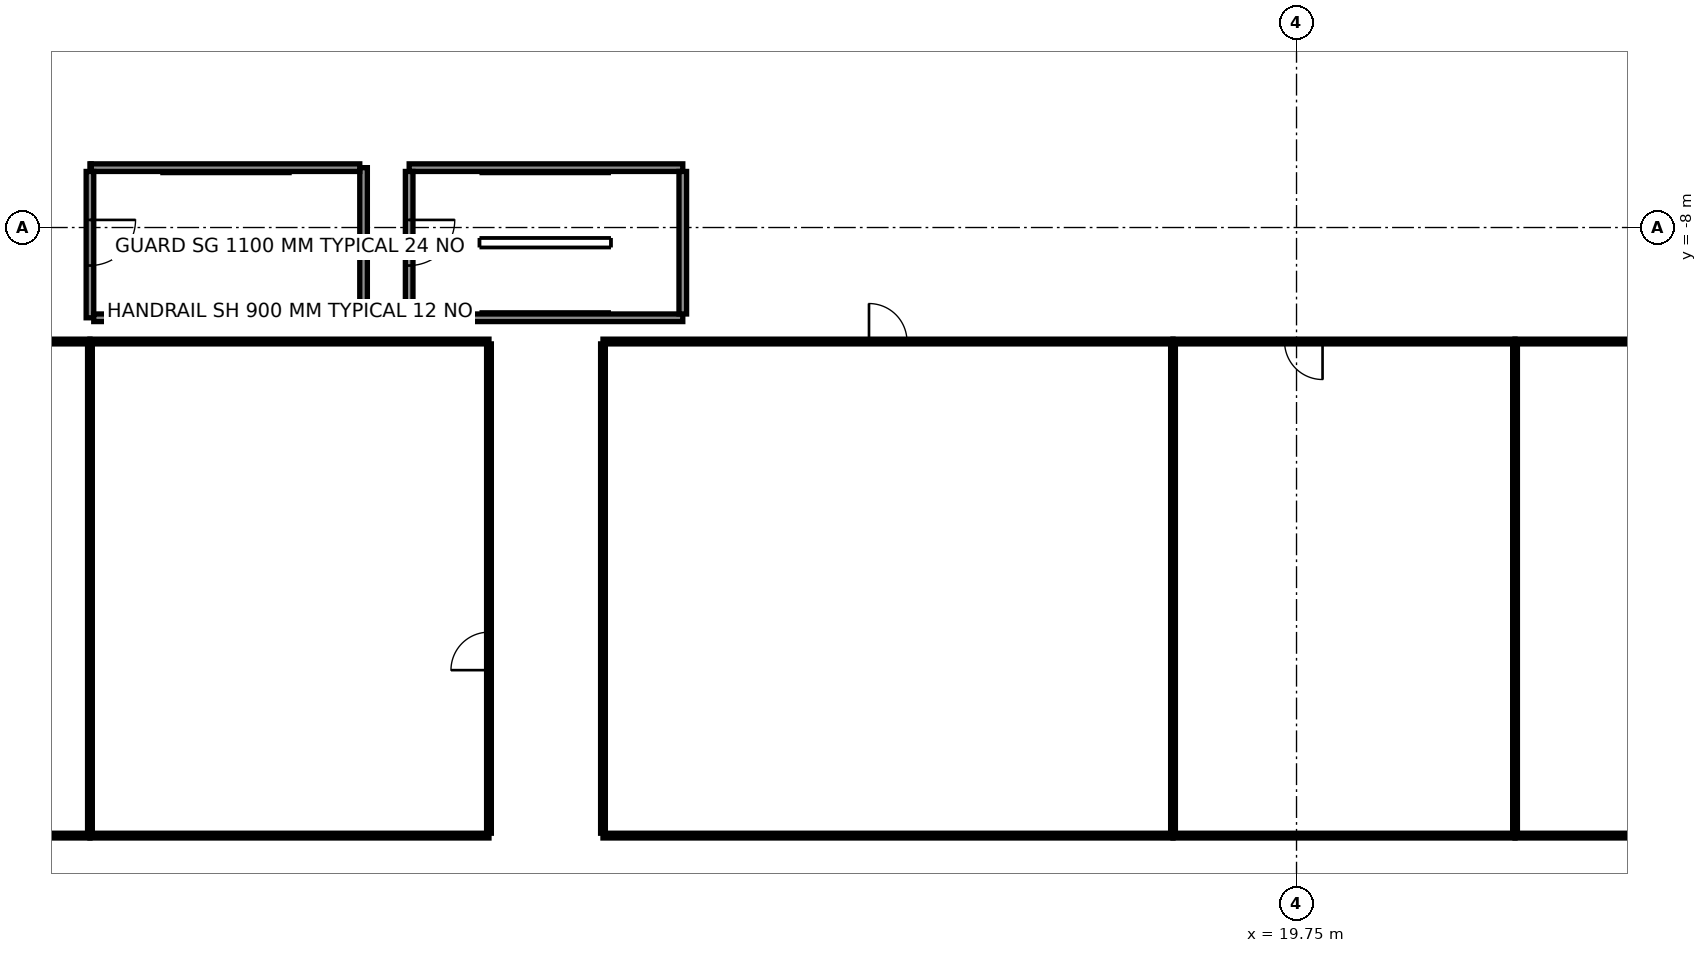
"""IFC4 building model, lengths in metres.
Left out: names, types, materials, properties, quantities, classifications, styles, units other than length and angle.
Written with IfcOpenShell. Run it as: python <this file> out.ifc"""

import sys

from ifc_helpers import new_model, si_unit, direction, frame, frame_2d, origin, origin_2d, place, context, subcontext, project, spatial, rectangle, hollow_rectangle, circle, extrude, element, fill, save


model = new_model("IFC4")
c1 = context("Model", 3, precision=1e-05, world=origin(), true_north=direction((0.0, 1.0)))
c2 = subcontext(c1, "Body", "Model", "MODEL_VIEW")
j1 = project(units=[si_unit("LENGTHUNIT", "METRE"), si_unit("PLANEANGLEUNIT", "RADIAN")], contexts=[c1])
p1 = place(None, origin())
s1 = spatial("IfcSite", under=j1, at=p1, CompositionType="ELEMENT")
p2 = place(p1, origin())
s2 = spatial("IfcBuilding", under=s1, at=p2, CompositionType="ELEMENT")
p3 = place(p2, frame((0.0, 0.0, 12.0)))
s3 = spatial("IfcBuildingStorey", under=s2, at=p3, CompositionType="ELEMENT", Elevation=12.0)
for number, where, z_axis, x_axis in (
    (1, (-4.2, -12.6, 0.0), (0.0, 0.0, 1.0), (1.0, 0.0, 0.0)),
    (2, (4.2, -12.6, 0.0), (0.0, 0.0, 1.0), (1.0, 0.0, 0.0)),
):
    element("IfcColumn", number, at=place(p3, frame(where, z_axis=z_axis, x_axis=x_axis)), inside=s3, PredefinedType="COLUMN", context=c2, shape_type="SweptSolid", body=[
        extrude(circle(Radius=0.6, at=origin_2d()), origin(), (0.0, 0.0, 1.0), 4.5),
    ])
for number, where, z_axis, x_axis in (
    (3, (-11.317, -11.797, 0.0), (0.0, 0.0, 1.0), (0.866, -0.5, 0.0)),
    (4, (8.96, -6.107, 0.0), (0.0, 0.0, 1.0), (-0.966, -0.259, 0.0)),
    (5, (14.594, -17.156, 0.0), (0.0, 0.0, 1.0), (-0.707, -0.707, 0.0)),
    (6, (25.643, -22.79, 0.0), (0.0, 0.0, 1.0), (-0.259, -0.966, 0.0)),
):
    element("IfcColumn", number, at=place(p3, frame(where, z_axis=z_axis, x_axis=x_axis)), inside=s3, PredefinedType="COLUMN", context=c2, shape_type="SweptSolid", body=[
        extrude(hollow_rectangle(XDim=1.5, YDim=1.5, WallThickness=0.07, at=origin_2d()), origin(), (0.0, 0.0, 1.0), 4.5),
    ])
p4 = place(p3, frame((19.3, -8.0, 0.0), z_axis=(0.0, 0.0, 1.0), x_axis=(1.0, 0.0, 0.0)))
e7 = element("IfcWall", 7, at=p4, inside=s3, PredefinedType="SHEAR", context=c2, shape_type="SweptSolid", body=[
    extrude(rectangle(XDim=24.9, YDim=0.9, at=frame_2d((12.45, 0.0))), origin(), (0.0, 0.0, 1.0), 4.5),
])
p5 = place(p4, frame((13.3, 0.0, 0.0)))
e8 = element("IfcOpeningElement", 8, at=p5, cuts=e7, PredefinedType="OPENING", context=c2, shape_type="SweptSolid", body=[
    extrude(rectangle(XDim=1.1, YDim=2.1, at=frame_2d((0.55, 1.05))), frame((0.0, 0.46, 0.0), z_axis=(0.0, -1.0, 0.0), x_axis=(1.0, 0.0, 0.0)), (0.0, 0.0, 1.0), 0.92),
])
p6 = place(p4, frame((1.775, 0.0, 0.0)))
e9 = element("IfcOpeningElement", 9, at=p6, cuts=e7, PredefinedType="OPENING", context=c2, shape_type="SweptSolid", body=[
    extrude(rectangle(XDim=0.9, YDim=2.1, at=frame_2d((0.45, 1.05))), frame((0.0, 0.46, 0.0), z_axis=(0.0, -1.0, 0.0), x_axis=(1.0, 0.0, 0.0)), (0.0, 0.0, 1.0), 0.92),
])
p7 = place(p4, frame((4.425, 0.0, 0.0)))
e10 = element("IfcOpeningElement", 10, at=p7, cuts=e7, PredefinedType="OPENING", context=c2, shape_type="SweptSolid", body=[
    extrude(rectangle(XDim=0.9, YDim=2.1, at=frame_2d((0.45, 1.05))), frame((0.0, 0.46, 0.0), z_axis=(0.0, -1.0, 0.0), x_axis=(1.0, 0.0, 0.0)), (0.0, 0.0, 1.0), 0.92),
])
p8 = place(p4, frame((6.675, 0.0, 0.0)))
e11 = element("IfcOpeningElement", 11, at=p8, cuts=e7, PredefinedType="OPENING", context=c2, shape_type="SweptSolid", body=[
    extrude(rectangle(XDim=1.0, YDim=2.1, at=frame_2d((0.5, 1.05))), frame((0.0, 0.46, 0.0), z_axis=(0.0, -1.0, 0.0), x_axis=(1.0, 0.0, 0.0)), (0.0, 0.0, 1.0), 0.92),
])
p9 = place(p3, frame((19.75, -8.0, 0.0), z_axis=(0.0, 0.0, 1.0), x_axis=(0.0, 1.0, 0.0)))
e12 = element("IfcWall", 12, at=p9, inside=s3, PredefinedType="SHEAR", context=c2, shape_type="SweptSolid", body=[
    extrude(rectangle(XDim=16.0, YDim=0.9, at=frame_2d((8.0, 0.0))), origin(), (0.0, 0.0, 1.0), 4.5),
])
p10 = place(p9, frame((7.1, 0.0, 0.0)))
e13 = element("IfcOpeningElement", 13, at=p10, cuts=e12, PredefinedType="OPENING", context=c2, shape_type="SweptSolid", body=[
    extrude(rectangle(XDim=1.8, YDim=2.1, at=frame_2d((0.9, 1.05))), frame((0.0, 0.46, 0.0), z_axis=(0.0, -1.0, 0.0), x_axis=(1.0, 0.0, 0.0)), (0.0, 0.0, 1.0), 0.92),
])
p11 = place(p3, frame((20.2, -4.275, 0.0), z_axis=(0.0, 0.0, 1.0), x_axis=(1.0, 0.0, 0.0)))
e14 = element("IfcWall", 14, at=p11, inside=s3, PredefinedType="SHEAR", context=c2, shape_type="SweptSolid", body=[
    extrude(rectangle(XDim=23.1, YDim=0.25, at=frame_2d((11.55, 0.0))), origin(), (0.0, 0.0, 1.0), 4.5),
])
for number, where, z_axis, x_axis in (
    (15, (22.669, -4.15, 0.0), (0.0, 0.0, 1.0), (0.0, 1.0, 0.0)),
    (16, (25.264, -4.15, 0.0), (0.0, 0.0, 1.0), (0.0, 1.0, 0.0)),
    (17, (27.858, -4.15, 0.0), (0.0, 0.0, 1.0), (0.0, 1.0, 0.0)),
):
    element("IfcWall", number, at=place(p3, frame(where, z_axis=z_axis, x_axis=x_axis)), inside=s3, PredefinedType="SHEAR", context=c2, shape_type="SweptSolid", body=[
        extrude(rectangle(XDim=2.4, YDim=0.25, at=frame_2d((1.2, 0.0))), origin(), (0.0, 0.0, 1.0), 4.5),
    ])
p12 = place(p3, frame((27.575, -4.4, 0.0), z_axis=(0.0, 0.0, 1.0), x_axis=(0.0, -1.0, 0.0)))
e18 = element("IfcWall", 18, at=p12, inside=s3, PredefinedType="SHEAR", context=c2, shape_type="SweptSolid", body=[
    extrude(rectangle(XDim=3.15, YDim=0.25, at=frame_2d((1.575, 0.0))), origin(), (0.0, 0.0, 1.0), 4.5),
])
for number, where, z_axis, x_axis in (
    (19, (22.95, -4.4, 0.0), (0.0, 0.0, 1.0), (0.0, -1.0, 0.0)),
    (20, (25.4, -4.4, 0.0), (0.0, 0.0, 1.0), (0.0, -1.0, 0.0)),
):
    element("IfcWall", number, at=place(p3, frame(where, z_axis=z_axis, x_axis=x_axis)), inside=s3, PredefinedType="PARTITIONING", context=c2, shape_type="SweptSolid", body=[
        extrude(rectangle(XDim=3.15, YDim=0.2, at=frame_2d((1.575, 0.0))), origin(), (0.0, 0.0, 1.0), 4.5),
    ])
p13 = place(p3, frame((-4.8, -10.375, 0.0), z_axis=(0.0, 0.0, 1.0), x_axis=(0.0, 1.0, 0.0)))
e21 = element("IfcWall", 21, at=p13, inside=s3, PredefinedType="SOLIDWALL", context=c2, shape_type="SweptSolid", body=[
    extrude(rectangle(XDim=3.95, YDim=0.2, at=frame_2d((1.975, 0.0))), origin(), (0.0, 0.0, 1.0), 4.2),
])
p14 = place(p3, frame((-4.9, -6.425, 0.0), z_axis=(0.0, 0.0, 1.0), x_axis=(-1.0, 0.0, 0.0)))
e22 = element("IfcWall", 22, at=p14, inside=s3, PredefinedType="SOLIDWALL", context=c2, shape_type="SweptSolid", body=[
    extrude(rectangle(XDim=7.068, YDim=0.2, at=frame_2d((3.534, 0.0))), origin(), (0.0, 0.0, 1.0), 4.2),
])
p15 = place(p3, frame((-11.968, -6.425, 0.0), z_axis=(0.0, 0.0, 1.0), x_axis=(-1.0, 0.0, 0.0)))
e23 = element("IfcWall", 23, at=p15, inside=s3, PredefinedType="SOLIDWALL", context=c2, shape_type="SweptSolid", body=[
    extrude(rectangle(XDim=0.032, YDim=0.2, at=frame_2d((0.016, 0.0))), origin(), (0.0, 0.0, 1.0), 3.496),
])
p16 = place(p3, frame((-12.0, -6.525, 0.0), z_axis=(0.0, 0.0, 1.0), x_axis=(0.0, -1.0, 0.0)))
e24 = element("IfcWall", 24, at=p16, inside=s3, PredefinedType="SOLIDWALL", context=c2, shape_type="SweptSolid", body=[
    extrude(rectangle(XDim=3.85, YDim=0.2, at=frame_2d((1.925, 0.0))), origin(), (0.0, 0.0, 1.0), 4.2),
])
p17 = place(p16, frame((1.275, 0.0, 0.0)))
e25 = element("IfcOpeningElement", 25, at=p17, cuts=e24, PredefinedType="OPENING", context=c2, shape_type="SweptSolid", body=[
    extrude(rectangle(XDim=1.2, YDim=2.1, at=frame_2d((0.6, 1.05))), frame((0.0, 0.11, 0.0), z_axis=(0.0, -1.0, 0.0), x_axis=(1.0, 0.0, 0.0)), (0.0, 0.0, 1.0), 0.22),
])
p18 = place(p3, frame((-11.9, -10.375, 0.0), z_axis=(0.0, 0.0, 1.0), x_axis=(1.0, 0.0, 0.0)))
e26 = element("IfcWall", 26, at=p18, inside=s3, PredefinedType="SOLIDWALL", context=c2, shape_type="SweptSolid", body=[
    extrude(rectangle(XDim=7.0, YDim=0.2, at=frame_2d((3.5, 0.0))), origin(), (0.0, 0.0, 1.0), 4.2),
])
p19 = place(p3, frame((3.6, -6.425, 0.0), z_axis=(0.0, 0.0, 1.0), x_axis=(-1.0, 0.0, 0.0)))
e27 = element("IfcWall", 27, at=p19, inside=s3, PredefinedType="SOLIDWALL", context=c2, shape_type="SweptSolid", body=[
    extrude(rectangle(XDim=7.2, YDim=0.2, at=frame_2d((3.6, 0.0))), origin(), (0.0, 0.0, 1.0), 4.2),
])
p20 = place(p3, frame((-3.6, -6.525, 0.0), z_axis=(0.0, 0.0, 1.0), x_axis=(0.0, -1.0, 0.0)))
e28 = element("IfcWall", 28, at=p20, inside=s3, PredefinedType="SOLIDWALL", context=c2, shape_type="SweptSolid", body=[
    extrude(rectangle(XDim=3.85, YDim=0.2, at=frame_2d((1.925, 0.0))), origin(), (0.0, 0.0, 1.0), 4.2),
])
p21 = place(p20, frame((1.275, 0.0, 0.0)))
e29 = element("IfcOpeningElement", 29, at=p21, cuts=e28, PredefinedType="OPENING", context=c2, shape_type="SweptSolid", body=[
    extrude(rectangle(XDim=1.2, YDim=2.1, at=frame_2d((0.6, 1.05))), frame((0.0, 0.11, 0.0), z_axis=(0.0, -1.0, 0.0), x_axis=(1.0, 0.0, 0.0)), (0.0, 0.0, 1.0), 0.22),
])
p22 = place(p3, frame((-3.5, -10.375, 0.0), z_axis=(0.0, 0.0, 1.0), x_axis=(1.0, 0.0, 0.0)))
e30 = element("IfcWall", 30, at=p22, inside=s3, PredefinedType="SOLIDWALL", context=c2, shape_type="SweptSolid", body=[
    extrude(rectangle(XDim=7.1, YDim=0.2, at=frame_2d((3.55, 0.0))), origin(), (0.0, 0.0, 1.0), 4.2),
])
p23 = place(p3, frame((3.6, -10.275, 0.0), z_axis=(0.0, 0.0, 1.0), x_axis=(0.0, 1.0, 0.0)))
e31 = element("IfcWall", 31, at=p23, inside=s3, PredefinedType="SOLIDWALL", context=c2, shape_type="SweptSolid", body=[
    extrude(rectangle(XDim=3.75, YDim=0.2, at=frame_2d((1.875, 0.0))), origin(), (0.0, 0.0, 1.0), 4.2),
])
p24 = place(p3, frame((-27.0, -11.0, 0.0), z_axis=(0.0, 0.0, 1.0), x_axis=(1.0, 0.0, 0.0)))
e32 = element("IfcWall", 32, at=p24, inside=s3, PredefinedType="PARTITIONING", context=c2, shape_type="SweptSolid", body=[
    extrude(rectangle(XDim=15.0, YDim=0.125, at=frame_2d((7.5, 0.0))), origin(), (0.0, 0.0, 1.0), 3.496),
])
p25 = place(p24, frame((5.035, 0.0, 0.0)))
e33 = element("IfcOpeningElement", 33, at=p25, cuts=e32, PredefinedType="OPENING", context=c2, shape_type="SweptSolid", body=[
    extrude(rectangle(XDim=1.0, YDim=2.1, at=frame_2d((0.5, 1.05))), frame((0.0, 0.073, 0.0), z_axis=(0.0, -1.0, 0.0), x_axis=(1.0, 0.0, 0.0)), (0.0, 0.0, 1.0), 0.145),
])
p26 = place(p3, frame((-12.0, -11.0, 0.0), z_axis=(0.0, 0.0, 1.0), x_axis=(1.0, 0.0, 0.0)))
e34 = element("IfcWall", 34, at=p26, inside=s3, PredefinedType="PARTITIONING", context=c2, shape_type="SweptSolid", body=[
    extrude(rectangle(XDim=10.5, YDim=0.125, at=frame_2d((5.25, 0.0))), origin(), (0.0, 0.0, 1.0), 4.2),
])
p27 = place(p3, frame((1.5, -11.0, 0.0), z_axis=(0.0, 0.0, 1.0), x_axis=(1.0, 0.0, 0.0)))
e35 = element("IfcWall", 35, at=p27, inside=s3, PredefinedType="PARTITIONING", context=c2, shape_type="SweptSolid", body=[
    extrude(rectangle(XDim=15.0, YDim=0.125, at=frame_2d((7.5, 0.0))), origin(), (0.0, 0.0, 1.0), 2.68),
])
p28 = place(p27, frame((7.0, 0.0, 0.0)))
e36 = element("IfcOpeningElement", 36, at=p28, cuts=e35, PredefinedType="OPENING", context=c2, shape_type="SweptSolid", body=[
    extrude(rectangle(XDim=1.0, YDim=2.1, at=frame_2d((0.5, 1.05))), frame((0.0, 0.073, 0.0), z_axis=(0.0, -1.0, 0.0), x_axis=(1.0, 0.0, 0.0)), (0.0, 0.0, 1.0), 0.145),
])
p29 = place(p3, frame((16.5, -11.0, 0.0), z_axis=(0.0, 0.0, 1.0), x_axis=(1.0, 0.0, 0.0)))
e37 = element("IfcWall", 37, at=p29, inside=s3, PredefinedType="PARTITIONING", context=c2, shape_type="SweptSolid", body=[
    extrude(rectangle(XDim=9.0, YDim=0.125, at=frame_2d((4.5, 0.0))), origin(), (0.0, 0.0, 1.0), 3.496),
])
p30 = place(p29, frame((2.935, 0.0, 0.0)))
e38 = element("IfcOpeningElement", 38, at=p30, cuts=e37, PredefinedType="OPENING", context=c2, shape_type="SweptSolid", body=[
    extrude(rectangle(XDim=1.0, YDim=2.1, at=frame_2d((0.5, 1.05))), frame((0.0, 0.073, 0.0), z_axis=(0.0, -1.0, 0.0), x_axis=(1.0, 0.0, 0.0)), (0.0, 0.0, 1.0), 0.145),
])
p31 = place(p3, frame((25.5, -11.0, 0.0), z_axis=(0.0, 0.0, 1.0), x_axis=(1.0, 0.0, 0.0)))
e39 = element("IfcWall", 39, at=p31, inside=s3, PredefinedType="PARTITIONING", context=c2, shape_type="SweptSolid", body=[
    extrude(rectangle(XDim=12.0, YDim=0.125, at=frame_2d((6.0, 0.0))), origin(), (0.0, 0.0, 1.0), 3.418),
])
p32 = place(p31, frame((7.015, 0.0, 0.0)))
e40 = element("IfcOpeningElement", 40, at=p32, cuts=e39, PredefinedType="OPENING", context=c2, shape_type="SweptSolid", body=[
    extrude(rectangle(XDim=1.0, YDim=2.1, at=frame_2d((0.5, 1.05))), frame((0.0, 0.073, 0.0), z_axis=(0.0, -1.0, 0.0), x_axis=(1.0, 0.0, 0.0)), (0.0, 0.0, 1.0), 0.145),
])
p33 = place(p3, frame((-12.0, -24.0, 0.0), z_axis=(0.0, 0.0, 1.0), x_axis=(-1.0, 0.0, 0.0)))
e41 = element("IfcWall", 41, at=p33, inside=s3, PredefinedType="PARTITIONING", context=c2, shape_type="SweptSolid", body=[
    extrude(rectangle(XDim=15.0, YDim=0.125, at=frame_2d((7.5, 0.0))), origin(), (0.0, 0.0, 1.0), 2.68),
])
p34 = place(p3, frame((-1.5, -24.0, 0.0), z_axis=(0.0, 0.0, 1.0), x_axis=(-1.0, 0.0, 0.0)))
e42 = element("IfcWall", 42, at=p34, inside=s3, PredefinedType="PARTITIONING", context=c2, shape_type="SweptSolid", body=[
    extrude(rectangle(XDim=10.5, YDim=0.125, at=frame_2d((5.25, 0.0))), origin(), (0.0, 0.0, 1.0), 2.68),
])
p35 = place(p3, frame((16.5, -24.0, 0.0), z_axis=(0.0, 0.0, 1.0), x_axis=(-1.0, 0.0, 0.0)))
e43 = element("IfcWall", 43, at=p35, inside=s3, PredefinedType="PARTITIONING", context=c2, shape_type="SweptSolid", body=[
    extrude(rectangle(XDim=15.0, YDim=0.125, at=frame_2d((7.5, 0.0))), origin(), (0.0, 0.0, 1.0), 2.68),
])
p36 = place(p3, frame((25.5, -24.0, 0.0), z_axis=(0.0, 0.0, 1.0), x_axis=(-1.0, 0.0, 0.0)))
e44 = element("IfcWall", 44, at=p36, inside=s3, PredefinedType="PARTITIONING", context=c2, shape_type="SweptSolid", body=[
    extrude(rectangle(XDim=9.0, YDim=0.125, at=frame_2d((4.5, 0.0))), origin(), (0.0, 0.0, 1.0), 4.2),
])
p37 = place(p3, frame((37.5, -24.0, 0.0), z_axis=(0.0, 0.0, 1.0), x_axis=(-1.0, 0.0, 0.0)))
e45 = element("IfcWall", 45, at=p37, inside=s3, PredefinedType="PARTITIONING", context=c2, shape_type="SweptSolid", body=[
    extrude(rectangle(XDim=12.0, YDim=0.125, at=frame_2d((6.0, 0.0))), origin(), (0.0, 0.0, 1.0), 2.68),
])
p38 = place(p3, frame((-1.5, -11.062, 0.0), z_axis=(0.0, 0.0, 1.0), x_axis=(0.0, -1.0, 0.0)))
e46 = element("IfcWall", 46, at=p38, inside=s3, PredefinedType="PARTITIONING", context=c2, shape_type="SweptSolid", body=[
    extrude(rectangle(XDim=12.875, YDim=0.125, at=frame_2d((6.438, 0.0))), origin(), (0.0, 0.0, 1.0), 2.68),
])
p39 = place(p38, frame((7.584, 0.0, 0.0)))
e47 = element("IfcOpeningElement", 47, at=p39, cuts=e46, PredefinedType="OPENING", context=c2, shape_type="SweptSolid", body=[
    extrude(rectangle(XDim=1.0, YDim=2.1, at=frame_2d((0.5, 1.05))), frame((0.0, 0.073, 0.0), z_axis=(0.0, -1.0, 0.0), x_axis=(1.0, 0.0, 0.0)), (0.0, 0.0, 1.0), 0.145),
])
p40 = place(p3, frame((1.5, -23.938, 0.0), z_axis=(0.0, 0.0, 1.0), x_axis=(0.0, 1.0, 0.0)))
e48 = element("IfcWall", 48, at=p40, inside=s3, PredefinedType="PARTITIONING", context=c2, shape_type="SweptSolid", body=[
    extrude(rectangle(XDim=12.875, YDim=0.125, at=frame_2d((6.438, 0.0))), origin(), (0.0, 0.0, 1.0), 2.68),
])
p41 = place(p3, frame((-12.0, -23.938, 0.0), z_axis=(0.0, 0.0, 1.0), x_axis=(0.0, 1.0, 0.0)))
e49 = element("IfcWall", 49, at=p41, inside=s3, PredefinedType="PARTITIONING", context=c2, shape_type="SweptSolid", body=[
    extrude(rectangle(XDim=12.875, YDim=0.125, at=frame_2d((6.438, 0.0))), origin(), (0.0, 0.0, 1.0), 3.727),
])
for number, where, z_axis, x_axis in (
    (50, (16.5, -23.938, 0.0), (0.0, 0.0, 1.0), (0.0, 1.0, 0.0)),
    (51, (25.5, -23.938, 0.0), (0.0, 0.0, 1.0), (0.0, 1.0, 0.0)),
):
    element("IfcWall", number, at=place(p3, frame(where, z_axis=z_axis, x_axis=x_axis)), inside=s3, PredefinedType="PARTITIONING", context=c2, shape_type="SweptSolid", body=[
        extrude(rectangle(XDim=12.875, YDim=0.125, at=frame_2d((6.438, 0.0))), origin(), (0.0, 0.0, 1.0), 3.496),
    ])
p42 = place(p6, origin())
e52 = element("IfcDoor", 52, at=p42, inside=s3, OperationType="SINGLE_SWING_RIGHT", PredefinedType="DOOR", context=c2, shape_type="SweptSolid", body=[
    extrude(rectangle(XDim=0.9, YDim=2.1, at=frame_2d((0.45, 1.05))), frame((0.0, 0.45, 0.0), z_axis=(0.0, -1.0, 0.0), x_axis=(1.0, 0.0, 0.0)), (0.0, 0.0, 1.0), 0.05),
])
fill(e9, e52)
p43 = place(p7, origin())
e53 = element("IfcDoor", 53, at=p43, inside=s3, OperationType="SINGLE_SWING_RIGHT", PredefinedType="DOOR", context=c2, shape_type="SweptSolid", body=[
    extrude(rectangle(XDim=0.9, YDim=2.1, at=frame_2d((0.45, 1.05))), frame((0.0, 0.45, 0.0), z_axis=(0.0, -1.0, 0.0), x_axis=(1.0, 0.0, 0.0)), (0.0, 0.0, 1.0), 0.05),
])
fill(e10, e53)
p44 = place(p8, origin())
e54 = element("IfcDoor", 54, at=p44, inside=s3, OperationType="SINGLE_SWING_LEFT", PredefinedType="DOOR", context=c2, shape_type="SweptSolid", body=[
    extrude(rectangle(XDim=1.0, YDim=2.1, at=frame_2d((0.5, 1.05))), frame((0.0, 0.45, 0.0), z_axis=(0.0, -1.0, 0.0), x_axis=(1.0, 0.0, 0.0)), (0.0, 0.0, 1.0), 0.05),
])
fill(e11, e54)
p45 = place(p39, origin())
e55 = element("IfcDoor", 55, at=p45, inside=s3, OperationType="SINGLE_SWING_RIGHT", PredefinedType="DOOR", context=c2, shape_type="SweptSolid", body=[
    extrude(rectangle(XDim=1.0, YDim=2.1, at=frame_2d((0.5, 1.05))), frame((0.0, 0.025, 0.0), z_axis=(0.0, -1.0, 0.0), x_axis=(1.0, 0.0, 0.0)), (0.0, 0.0, 1.0), 0.05),
])
fill(e47, e55)
p46 = place(p28, origin())
e56 = element("IfcDoor", 56, at=p46, inside=s3, OperationType="SINGLE_SWING_LEFT", PredefinedType="DOOR", context=c2, shape_type="SweptSolid", body=[
    extrude(rectangle(XDim=1.0, YDim=2.1, at=frame_2d((0.5, 1.05))), frame((0.0, 0.025, 0.0), z_axis=(0.0, -1.0, 0.0), x_axis=(1.0, 0.0, 0.0)), (0.0, 0.0, 1.0), 0.05),
])
fill(e36, e56)
p47 = place(p30, origin())
e57 = element("IfcDoor", 57, at=p47, inside=s3, OperationType="SINGLE_SWING_RIGHT", PredefinedType="DOOR", context=c2, shape_type="SweptSolid", body=[
    extrude(rectangle(XDim=1.0, YDim=2.1, at=frame_2d((0.5, 1.05))), frame((0.0, 0.025, 0.0), z_axis=(0.0, -1.0, 0.0), x_axis=(1.0, 0.0, 0.0)), (0.0, 0.0, 1.0), 0.05),
])
fill(e38, e57)
p48 = place(p17, frame((1.2, 0.0, 0.0), z_axis=(0.0, 0.0, 1.0), x_axis=(-1.0, 0.0, 0.0)))
e58 = element("IfcDoor", 58, at=p48, inside=s3, OperationType="SINGLE_SWING_LEFT", PredefinedType="DOOR", context=c2, shape_type="SweptSolid", body=[
    extrude(rectangle(XDim=1.2, YDim=2.1, at=frame_2d((0.6, 1.05))), frame((0.0, 0.025, 0.0), z_axis=(0.0, -1.0, 0.0), x_axis=(1.0, 0.0, 0.0)), (0.0, 0.0, 1.0), 0.05),
])
fill(e25, e58)
p49 = place(p21, frame((1.2, 0.0, 0.0), z_axis=(0.0, 0.0, 1.0), x_axis=(-1.0, 0.0, 0.0)))
e59 = element("IfcDoor", 59, at=p49, inside=s3, OperationType="SINGLE_SWING_LEFT", PredefinedType="DOOR", context=c2, shape_type="SweptSolid", body=[
    extrude(rectangle(XDim=1.2, YDim=2.1, at=frame_2d((0.6, 1.05))), frame((0.0, 0.025, 0.0), z_axis=(0.0, -1.0, 0.0), x_axis=(1.0, 0.0, 0.0)), (0.0, 0.0, 1.0), 0.05),
])
fill(e29, e59)
save(model, sys.argv[1])
